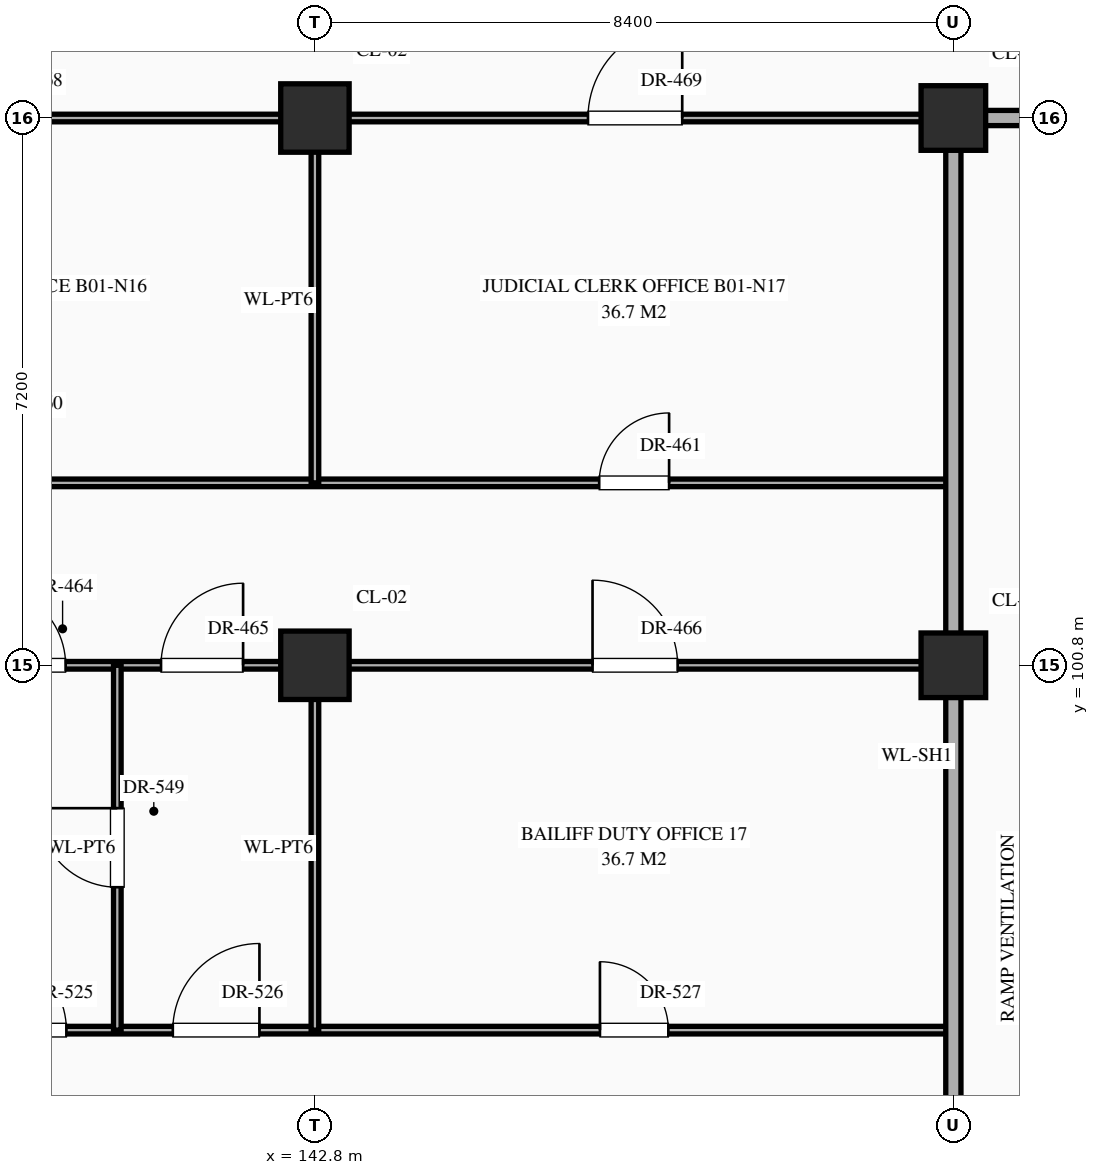
"""IFC4 building model, lengths in metres.
Left out: names, types, materials, properties, quantities, classifications, styles, units other than length and angle.
Written with IfcOpenShell. Run it as: python <this file> out.ifc"""

import sys

from ifc_helpers import new_model, si_unit, direction, frame, frame_2d, origin, origin_2d, place, context, subcontext, project, spatial, rectangle, extrude, element, fill, save


model = new_model("IFC4")
c1 = context("Model", 3, precision=1e-05, world=origin(), true_north=direction((0.0, 1.0)))
c2 = subcontext(c1, "Body", "Model", "MODEL_VIEW")
j1 = project(units=[si_unit("LENGTHUNIT", "METRE"), si_unit("PLANEANGLEUNIT", "RADIAN")], contexts=[c1])
p1 = place(None, origin())
s1 = spatial("IfcSite", under=j1, at=p1, CompositionType="ELEMENT")
p2 = place(p1, origin())
s2 = spatial("IfcBuilding", under=s1, at=p2, CompositionType="ELEMENT")
p3 = place(p2, frame((0.0, 0.0, -5.4)))
s3 = spatial("IfcBuildingStorey", under=s2, at=p3, CompositionType="ELEMENT", Elevation=-5.4)
for number, where, z_axis, x_axis in (
    (1, (142.8, 100.8, 0.0), (0.0, 0.0, 1.0), (1.0, 0.0, 0.0)),
    (2, (142.8, 108.0, 0.0), (0.0, 0.0, 1.0), (1.0, 0.0, 0.0)),
):
    element("IfcColumn", number, at=place(p3, frame(where, z_axis=z_axis, x_axis=x_axis)), inside=s3, PredefinedType="COLUMN", context=c2, shape_type="SweptSolid", body=[
        extrude(rectangle(XDim=0.9, YDim=0.9, at=origin_2d()), origin(), (0.0, 0.0, 1.0), 5.4),
    ])
for number, where, z_axis, x_axis in (
    (3, (151.2, 100.8, 0.0), (0.0, 0.0, 1.0), (1.0, 0.0, 0.0)),
    (4, (151.2, 108.0, 0.0), (0.0, 0.0, 1.0), (1.0, 0.0, 0.0)),
):
    element("IfcColumn", number, at=place(p3, frame(where, z_axis=z_axis, x_axis=x_axis)), inside=s3, PredefinedType="COLUMN", context=c2, shape_type="SweptSolid", body=[
        extrude(rectangle(XDim=0.85, YDim=0.85, at=origin_2d()), origin(), (0.0, 0.0, 1.0), 5.4),
    ])
p4 = place(p3, frame((16.8, 96.0, 0.0), z_axis=(0.0, 0.0, 1.0), x_axis=(1.0, 0.0, 0.0)))
e5 = element("IfcWall", 5, at=p4, inside=s3, PredefinedType="STANDARD", context=c2, shape_type="SweptSolid", body=[
    extrude(rectangle(XDim=134.4, YDim=0.1, at=frame_2d((67.2, 0.0))), origin(), (0.0, 0.0, 1.0), 5.1),
])
p5 = place(p4, frame((3.56, 0.0, 0.0)))
e6 = element("IfcOpeningElement", 6, at=p5, cuts=e5, PredefinedType="OPENING", context=c2, shape_type="SweptSolid", body=[
    extrude(rectangle(XDim=1.28, YDim=2.35, at=frame_2d((0.64, 1.175))), frame((0.0, 0.062, 0.0), z_axis=(0.0, -1.0, 0.0), x_axis=(1.0, 0.0, 0.0)), (0.0, 0.0, 1.0), 0.124),
])
p6 = place(p4, frame((9.63, 0.0, 0.0)))
e7 = element("IfcOpeningElement", 7, at=p6, cuts=e5, PredefinedType="OPENING", context=c2, shape_type="SweptSolid", body=[
    extrude(rectangle(XDim=0.94, YDim=2.3, at=frame_2d((0.47, 1.15))), frame((0.0, 0.062, 0.0), z_axis=(0.0, -1.0, 0.0), x_axis=(1.0, 0.0, 0.0)), (0.0, 0.0, 1.0), 0.124),
])
p7 = place(p4, frame((12.51, 0.0, 0.0)))
e8 = element("IfcOpeningElement", 8, at=p7, cuts=e5, PredefinedType="OPENING", context=c2, shape_type="SweptSolid", body=[
    extrude(rectangle(XDim=0.98, YDim=2.35, at=frame_2d((0.49, 1.175))), frame((0.0, 0.062, 0.0), z_axis=(0.0, -1.0, 0.0), x_axis=(1.0, 0.0, 0.0)), (0.0, 0.0, 1.0), 0.124),
])
p8 = place(p4, frame((14.99, 0.0, 0.0)))
e9 = element("IfcOpeningElement", 9, at=p8, cuts=e5, PredefinedType="OPENING", context=c2, shape_type="SweptSolid", body=[
    extrude(rectangle(XDim=1.02, YDim=2.4, at=frame_2d((0.51, 1.2))), frame((0.0, 0.062, 0.0), z_axis=(0.0, -1.0, 0.0), x_axis=(1.0, 0.0, 0.0)), (0.0, 0.0, 1.0), 0.124),
])
p9 = place(p4, frame((20.47, 0.0, 0.0)))
e10 = element("IfcOpeningElement", 10, at=p9, cuts=e5, PredefinedType="OPENING", context=c2, shape_type="SweptSolid", body=[
    extrude(rectangle(XDim=1.06, YDim=2.4, at=frame_2d((0.53, 1.2))), frame((0.0, 0.062, 0.0), z_axis=(0.0, -1.0, 0.0), x_axis=(1.0, 0.0, 0.0)), (0.0, 0.0, 1.0), 0.124),
])
p10 = place(p4, frame((28.83, 0.0, 0.0)))
e11 = element("IfcOpeningElement", 11, at=p10, cuts=e5, PredefinedType="OPENING", context=c2, shape_type="SweptSolid", body=[
    extrude(rectangle(XDim=1.14, YDim=2.4, at=frame_2d((0.57, 1.2))), frame((0.0, 0.062, 0.0), z_axis=(0.0, -1.0, 0.0), x_axis=(1.0, 0.0, 0.0)), (0.0, 0.0, 1.0), 0.124),
])
p11 = place(p4, frame((34.78, 0.0, 0.0)))
e12 = element("IfcOpeningElement", 12, at=p11, cuts=e5, PredefinedType="OPENING", context=c2, shape_type="SweptSolid", body=[
    extrude(rectangle(XDim=1.04, YDim=2.2, at=frame_2d((0.52, 1.1))), frame((0.0, 0.062, 0.0), z_axis=(0.0, -1.0, 0.0), x_axis=(1.0, 0.0, 0.0)), (0.0, 0.0, 1.0), 0.124),
])
p12 = place(p4, frame((37.66, 0.0, 0.0)))
e13 = element("IfcOpeningElement", 13, at=p12, cuts=e5, PredefinedType="OPENING", context=c2, shape_type="SweptSolid", body=[
    extrude(rectangle(XDim=1.08, YDim=2.25, at=frame_2d((0.54, 1.125))), frame((0.0, 0.062, 0.0), z_axis=(0.0, -1.0, 0.0), x_axis=(1.0, 0.0, 0.0)), (0.0, 0.0, 1.0), 0.124),
])
p13 = place(p4, frame((40.14, 0.0, 0.0)))
e14 = element("IfcOpeningElement", 14, at=p13, cuts=e5, PredefinedType="OPENING", context=c2, shape_type="SweptSolid", body=[
    extrude(rectangle(XDim=1.12, YDim=2.25, at=frame_2d((0.56, 1.125))), frame((0.0, 0.062, 0.0), z_axis=(0.0, -1.0, 0.0), x_axis=(1.0, 0.0, 0.0)), (0.0, 0.0, 1.0), 0.124),
])
p14 = place(p4, frame((45.62, 0.0, 0.0)))
e15 = element("IfcOpeningElement", 15, at=p14, cuts=e5, PredefinedType="OPENING", context=c2, shape_type="SweptSolid", body=[
    extrude(rectangle(XDim=1.16, YDim=2.3, at=frame_2d((0.58, 1.15))), frame((0.0, 0.062, 0.0), z_axis=(0.0, -1.0, 0.0), x_axis=(1.0, 0.0, 0.0)), (0.0, 0.0, 1.0), 0.124),
])
p15 = place(p4, frame((54.0, 0.0, 0.0)))
e16 = element("IfcOpeningElement", 16, at=p15, cuts=e5, PredefinedType="OPENING", context=c2, shape_type="SweptSolid", body=[
    extrude(rectangle(XDim=1.2, YDim=2.35, at=frame_2d((0.6, 1.175))), frame((0.0, 0.062, 0.0), z_axis=(0.0, -1.0, 0.0), x_axis=(1.0, 0.0, 0.0)), (0.0, 0.0, 1.0), 0.124),
])
p16 = place(p4, frame((62.38, 0.0, 0.0)))
e17 = element("IfcOpeningElement", 17, at=p16, cuts=e5, PredefinedType="OPENING", context=c2, shape_type="SweptSolid", body=[
    extrude(rectangle(XDim=1.24, YDim=2.3, at=frame_2d((0.62, 1.15))), frame((0.0, 0.062, 0.0), z_axis=(0.0, -1.0, 0.0), x_axis=(1.0, 0.0, 0.0)), (0.0, 0.0, 1.0), 0.124),
])
p17 = place(p4, frame((68.37, 0.0, 0.0)))
e18 = element("IfcOpeningElement", 18, at=p17, cuts=e5, PredefinedType="OPENING", context=c2, shape_type="SweptSolid", body=[
    extrude(rectangle(XDim=1.06, YDim=2.4, at=frame_2d((0.53, 1.2))), frame((0.0, 0.062, 0.0), z_axis=(0.0, -1.0, 0.0), x_axis=(1.0, 0.0, 0.0)), (0.0, 0.0, 1.0), 0.124),
])
p18 = place(p4, frame((71.23, 0.0, 0.0)))
e19 = element("IfcOpeningElement", 19, at=p18, cuts=e5, PredefinedType="OPENING", context=c2, shape_type="SweptSolid", body=[
    extrude(rectangle(XDim=1.14, YDim=2.4, at=frame_2d((0.57, 1.2))), frame((0.0, 0.062, 0.0), z_axis=(0.0, -1.0, 0.0), x_axis=(1.0, 0.0, 0.0)), (0.0, 0.0, 1.0), 0.124),
])
p19 = place(p4, frame((73.85, 0.0, 0.0)))
e20 = element("IfcOpeningElement", 20, at=p19, cuts=e5, PredefinedType="OPENING", context=c2, shape_type="SweptSolid", body=[
    extrude(rectangle(XDim=0.9, YDim=2.15, at=frame_2d((0.45, 1.075))), frame((0.0, 0.062, 0.0), z_axis=(0.0, -1.0, 0.0), x_axis=(1.0, 0.0, 0.0)), (0.0, 0.0, 1.0), 0.124),
])
p20 = place(p4, frame((79.37, 0.0, 0.0)))
e21 = element("IfcOpeningElement", 21, at=p20, cuts=e5, PredefinedType="OPENING", context=c2, shape_type="SweptSolid", body=[
    extrude(rectangle(XDim=0.86, YDim=2.1, at=frame_2d((0.43, 1.05))), frame((0.0, 0.062, 0.0), z_axis=(0.0, -1.0, 0.0), x_axis=(1.0, 0.0, 0.0)), (0.0, 0.0, 1.0), 0.124),
])
p21 = place(p4, frame((87.74, 0.0, 0.0)))
e22 = element("IfcOpeningElement", 22, at=p21, cuts=e5, PredefinedType="OPENING", context=c2, shape_type="SweptSolid", body=[
    extrude(rectangle(XDim=0.92, YDim=2.15, at=frame_2d((0.46, 1.075))), frame((0.0, 0.062, 0.0), z_axis=(0.0, -1.0, 0.0), x_axis=(1.0, 0.0, 0.0)), (0.0, 0.0, 1.0), 0.124),
])
p22 = place(p4, frame((93.62, 0.0, 0.0)))
e23 = element("IfcOpeningElement", 23, at=p22, cuts=e5, PredefinedType="OPENING", context=c2, shape_type="SweptSolid", body=[
    extrude(rectangle(XDim=0.96, YDim=2.2, at=frame_2d((0.48, 1.1))), frame((0.0, 0.062, 0.0), z_axis=(0.0, -1.0, 0.0), x_axis=(1.0, 0.0, 0.0)), (0.0, 0.0, 1.0), 0.124),
])
p23 = place(p4, frame((96.5, 0.0, 0.0)))
e24 = element("IfcOpeningElement", 24, at=p23, cuts=e5, PredefinedType="OPENING", context=c2, shape_type="SweptSolid", body=[
    extrude(rectangle(XDim=1.0, YDim=2.25, at=frame_2d((0.5, 1.125))), frame((0.0, 0.062, 0.0), z_axis=(0.0, -1.0, 0.0), x_axis=(1.0, 0.0, 0.0)), (0.0, 0.0, 1.0), 0.124),
])
p24 = place(p4, frame((98.98, 0.0, 0.0)))
e25 = element("IfcOpeningElement", 25, at=p24, cuts=e5, PredefinedType="OPENING", context=c2, shape_type="SweptSolid", body=[
    extrude(rectangle(XDim=1.04, YDim=2.2, at=frame_2d((0.52, 1.1))), frame((0.0, 0.062, 0.0), z_axis=(0.0, -1.0, 0.0), x_axis=(1.0, 0.0, 0.0)), (0.0, 0.0, 1.0), 0.124),
])
p25 = place(p4, frame((104.53, 0.0, 0.0)))
e26 = element("IfcOpeningElement", 26, at=p25, cuts=e5, PredefinedType="OPENING", context=c2, shape_type="SweptSolid", body=[
    extrude(rectangle(XDim=0.94, YDim=2.3, at=frame_2d((0.47, 1.15))), frame((0.0, 0.062, 0.0), z_axis=(0.0, -1.0, 0.0), x_axis=(1.0, 0.0, 0.0)), (0.0, 0.0, 1.0), 0.124),
])
p26 = place(p4, frame((112.91, 0.0, 0.0)))
e27 = element("IfcOpeningElement", 27, at=p26, cuts=e5, PredefinedType="OPENING", context=c2, shape_type="SweptSolid", body=[
    extrude(rectangle(XDim=0.98, YDim=2.35, at=frame_2d((0.49, 1.175))), frame((0.0, 0.062, 0.0), z_axis=(0.0, -1.0, 0.0), x_axis=(1.0, 0.0, 0.0)), (0.0, 0.0, 1.0), 0.124),
])
p27 = place(p4, frame((118.79, 0.0, 0.0)))
e28 = element("IfcOpeningElement", 28, at=p27, cuts=e5, PredefinedType="OPENING", context=c2, shape_type="SweptSolid", body=[
    extrude(rectangle(XDim=1.02, YDim=2.4, at=frame_2d((0.51, 1.2))), frame((0.0, 0.062, 0.0), z_axis=(0.0, -1.0, 0.0), x_axis=(1.0, 0.0, 0.0)), (0.0, 0.0, 1.0), 0.124),
])
p28 = place(p4, frame((121.67, 0.0, 0.0)))
e29 = element("IfcOpeningElement", 29, at=p28, cuts=e5, PredefinedType="OPENING", context=c2, shape_type="SweptSolid", body=[
    extrude(rectangle(XDim=1.06, YDim=2.4, at=frame_2d((0.53, 1.2))), frame((0.0, 0.062, 0.0), z_axis=(0.0, -1.0, 0.0), x_axis=(1.0, 0.0, 0.0)), (0.0, 0.0, 1.0), 0.124),
])
p29 = place(p4, frame((124.13, 0.0, 0.0)))
e30 = element("IfcOpeningElement", 30, at=p29, cuts=e5, PredefinedType="OPENING", context=c2, shape_type="SweptSolid", body=[
    extrude(rectangle(XDim=1.14, YDim=2.4, at=frame_2d((0.57, 1.2))), frame((0.0, 0.062, 0.0), z_axis=(0.0, -1.0, 0.0), x_axis=(1.0, 0.0, 0.0)), (0.0, 0.0, 1.0), 0.124),
])
p30 = place(p4, frame((129.75, 0.0, 0.0)))
e31 = element("IfcOpeningElement", 31, at=p30, cuts=e5, PredefinedType="OPENING", context=c2, shape_type="SweptSolid", body=[
    extrude(rectangle(XDim=0.9, YDim=2.15, at=frame_2d((0.45, 1.075))), frame((0.0, 0.062, 0.0), z_axis=(0.0, -1.0, 0.0), x_axis=(1.0, 0.0, 0.0)), (0.0, 0.0, 1.0), 0.124),
])
p31 = place(p3, frame((126.0, 100.8, 0.0), z_axis=(0.0, 0.0, 1.0), x_axis=(1.0, 0.0, 0.0)))
e32 = element("IfcWall", 32, at=p31, inside=s3, PredefinedType="STANDARD", context=c2, shape_type="SweptSolid", body=[
    extrude(rectangle(XDim=25.2, YDim=0.1, at=frame_2d((12.6, 0.0))), origin(), (0.0, 0.0, 1.0), 4.25),
])
p32 = place(p31, frame((3.72, 0.0, 0.0)))
e33 = element("IfcOpeningElement", 33, at=p32, cuts=e32, PredefinedType="OPENING", context=c2, shape_type="SweptSolid", body=[
    extrude(rectangle(XDim=0.96, YDim=2.2, at=frame_2d((0.48, 1.1))), frame((0.0, 0.062, 0.0), z_axis=(0.0, -1.0, 0.0), x_axis=(1.0, 0.0, 0.0)), (0.0, 0.0, 1.0), 0.124),
])
p33 = place(p31, frame((9.785, 0.0, 0.0)))
e34 = element("IfcOpeningElement", 34, at=p33, cuts=e32, PredefinedType="OPENING", context=c2, shape_type="SweptSolid", body=[
    extrude(rectangle(XDim=1.0, YDim=2.25, at=frame_2d((0.5, 1.125))), frame((0.0, 0.062, 0.0), z_axis=(0.0, -1.0, 0.0), x_axis=(1.0, 0.0, 0.0)), (0.0, 0.0, 1.0), 0.124),
])
p34 = place(p31, frame((12.48, 0.0, 0.0)))
e35 = element("IfcOpeningElement", 35, at=p34, cuts=e32, PredefinedType="OPENING", context=c2, shape_type="SweptSolid", body=[
    extrude(rectangle(XDim=1.04, YDim=2.2, at=frame_2d((0.52, 1.1))), frame((0.0, 0.062, 0.0), z_axis=(0.0, -1.0, 0.0), x_axis=(1.0, 0.0, 0.0)), (0.0, 0.0, 1.0), 0.124),
])
p35 = place(p31, frame((14.775, 0.0, 0.0)))
e36 = element("IfcOpeningElement", 36, at=p35, cuts=e32, PredefinedType="OPENING", context=c2, shape_type="SweptSolid", body=[
    extrude(rectangle(XDim=1.08, YDim=2.25, at=frame_2d((0.54, 1.125))), frame((0.0, 0.062, 0.0), z_axis=(0.0, -1.0, 0.0), x_axis=(1.0, 0.0, 0.0)), (0.0, 0.0, 1.0), 0.124),
])
p36 = place(p31, frame((20.452, 0.0, 0.0)))
e37 = element("IfcOpeningElement", 37, at=p36, cuts=e32, PredefinedType="OPENING", context=c2, shape_type="SweptSolid", body=[
    extrude(rectangle(XDim=1.12, YDim=2.25, at=frame_2d((0.56, 1.125))), frame((0.0, 0.062, 0.0), z_axis=(0.0, -1.0, 0.0), x_axis=(1.0, 0.0, 0.0)), (0.0, 0.0, 1.0), 0.124),
])
p37 = place(p3, frame((126.0, 103.2, 0.0), z_axis=(0.0, 0.0, 1.0), x_axis=(1.0, 0.0, 0.0)))
e38 = element("IfcWall", 38, at=p37, inside=s3, PredefinedType="STANDARD", context=c2, shape_type="SweptSolid", body=[
    extrude(rectangle(XDim=25.2, YDim=0.1, at=frame_2d((12.6, 0.0))), origin(), (0.0, 0.0, 1.0), 5.1),
])
p38 = place(p37, frame((3.75, 0.0, 0.0)))
e39 = element("IfcOpeningElement", 39, at=p38, cuts=e38, PredefinedType="OPENING", context=c2, shape_type="SweptSolid", body=[
    extrude(rectangle(XDim=0.9, YDim=2.15, at=frame_2d((0.45, 1.075))), frame((0.0, 0.062, 0.0), z_axis=(0.0, -1.0, 0.0), x_axis=(1.0, 0.0, 0.0)), (0.0, 0.0, 1.0), 0.124),
])
p39 = place(p37, frame((12.17, 0.0, 0.0)))
e40 = element("IfcOpeningElement", 40, at=p39, cuts=e38, PredefinedType="OPENING", context=c2, shape_type="SweptSolid", body=[
    extrude(rectangle(XDim=0.86, YDim=2.1, at=frame_2d((0.43, 1.05))), frame((0.0, 0.062, 0.0), z_axis=(0.0, -1.0, 0.0), x_axis=(1.0, 0.0, 0.0)), (0.0, 0.0, 1.0), 0.124),
])
p40 = place(p37, frame((20.54, 0.0, 0.0)))
e41 = element("IfcOpeningElement", 41, at=p40, cuts=e38, PredefinedType="OPENING", context=c2, shape_type="SweptSolid", body=[
    extrude(rectangle(XDim=0.92, YDim=2.15, at=frame_2d((0.46, 1.075))), frame((0.0, 0.062, 0.0), z_axis=(0.0, -1.0, 0.0), x_axis=(1.0, 0.0, 0.0)), (0.0, 0.0, 1.0), 0.124),
])
p41 = place(p3, frame((126.0, 108.0, 0.0), z_axis=(0.0, 0.0, 1.0), x_axis=(1.0, 0.0, 0.0)))
e42 = element("IfcWall", 42, at=p41, inside=s3, PredefinedType="STANDARD", context=c2, shape_type="SweptSolid", body=[
    extrude(rectangle(XDim=25.2, YDim=0.1, at=frame_2d((12.6, 0.0))), origin(), (0.0, 0.0, 1.0), 4.13),
])
p42 = place(p41, frame((3.62, 0.0, 0.0)))
e43 = element("IfcOpeningElement", 43, at=p42, cuts=e42, PredefinedType="OPENING", context=c2, shape_type="SweptSolid", body=[
    extrude(rectangle(XDim=1.16, YDim=2.3, at=frame_2d((0.58, 1.15))), frame((0.0, 0.062, 0.0), z_axis=(0.0, -1.0, 0.0), x_axis=(1.0, 0.0, 0.0)), (0.0, 0.0, 1.0), 0.124),
])
p43 = place(p41, frame((12.0, 0.0, 0.0)))
e44 = element("IfcOpeningElement", 44, at=p43, cuts=e42, PredefinedType="OPENING", context=c2, shape_type="SweptSolid", body=[
    extrude(rectangle(XDim=1.2, YDim=2.35, at=frame_2d((0.6, 1.175))), frame((0.0, 0.062, 0.0), z_axis=(0.0, -1.0, 0.0), x_axis=(1.0, 0.0, 0.0)), (0.0, 0.0, 1.0), 0.124),
])
p44 = place(p41, frame((20.393, 0.0, 0.0)))
e45 = element("IfcOpeningElement", 45, at=p44, cuts=e42, PredefinedType="OPENING", context=c2, shape_type="SweptSolid", body=[
    extrude(rectangle(XDim=1.24, YDim=2.3, at=frame_2d((0.62, 1.15))), frame((0.0, 0.062, 0.0), z_axis=(0.0, -1.0, 0.0), x_axis=(1.0, 0.0, 0.0)), (0.0, 0.0, 1.0), 0.124),
])
p45 = place(p3, frame((151.2, 108.0, 0.0), z_axis=(0.0, 0.0, 1.0), x_axis=(1.0, 0.0, 0.0)))
e46 = element("IfcWall", 46, at=p45, inside=s3, PredefinedType="STANDARD", context=c2, shape_type="SweptSolid", body=[
    extrude(rectangle(XDim=6.6, YDim=0.2, at=frame_2d((3.3, 0.0))), origin(), (0.0, 0.0, 1.0), 4.13),
])
p46 = place(p3, frame((140.2, 96.0, 0.0), z_axis=(0.0, 0.0, 1.0), x_axis=(0.0, 1.0, 0.0)))
e47 = element("IfcWall", 47, at=p46, inside=s3, PredefinedType="STANDARD", context=c2, shape_type="SweptSolid", body=[
    extrude(rectangle(XDim=4.8, YDim=0.1, at=frame_2d((2.4, 0.0))), origin(), (0.0, 0.0, 1.0), 5.1),
])
p47 = place(p46, frame((1.88, 0.0, 0.0)))
e48 = element("IfcOpeningElement", 48, at=p47, cuts=e47, PredefinedType="OPENING", context=c2, shape_type="SweptSolid", body=[
    extrude(rectangle(XDim=1.04, YDim=2.2, at=frame_2d((0.52, 1.1))), frame((0.0, 0.062, 0.0), z_axis=(0.0, -1.0, 0.0), x_axis=(1.0, 0.0, 0.0)), (0.0, 0.0, 1.0), 0.124),
])
for number, where, z_axis, x_axis in (
    (49, (142.8, 96.0, 0.0), (0.0, 0.0, 1.0), (0.0, 1.0, 0.0)),
    (50, (142.8, 103.2, 0.0), (0.0, 0.0, 1.0), (0.0, 1.0, 0.0)),
):
    element("IfcWall", number, at=place(p3, frame(where, z_axis=z_axis, x_axis=x_axis)), inside=s3, PredefinedType="STANDARD", context=c2, shape_type="SweptSolid", body=[
        extrude(rectangle(XDim=4.8, YDim=0.1, at=frame_2d((2.4, 0.0))), origin(), (0.0, 0.0, 1.0), 4.35),
    ])
p48 = place(p3, frame((151.2, 91.2, 0.0), z_axis=(0.0, 0.0, 1.0), x_axis=(0.0, 1.0, 0.0)))
e51 = element("IfcWall", 51, at=p48, inside=s3, PredefinedType="STANDARD", context=c2, shape_type="SweptSolid", body=[
    extrude(rectangle(XDim=16.8, YDim=0.2, at=frame_2d((8.4, 0.0))), origin(), (0.0, 0.0, 1.0), 4.35),
])
p49 = place(p40, origin())
e52 = element("IfcDoor", 52, at=p49, inside=s3, OperationType="SINGLE_SWING_RIGHT", PredefinedType="DOOR", context=c2, shape_type="SweptSolid", body=[
    extrude(rectangle(XDim=0.92, YDim=2.15, at=frame_2d((0.46, 1.075))), frame((0.0, 0.025, 0.0), z_axis=(0.0, -1.0, 0.0), x_axis=(1.0, 0.0, 0.0)), (0.0, 0.0, 1.0), 0.05),
])
fill(e41, e52)
p50 = place(p34, origin())
e53 = element("IfcDoor", 53, at=p50, inside=s3, OperationType="SINGLE_SWING_LEFT", PredefinedType="DOOR", context=c2, shape_type="SweptSolid", body=[
    extrude(rectangle(XDim=1.04, YDim=2.2, at=frame_2d((0.52, 1.1))), frame((0.0, 0.025, 0.0), z_axis=(0.0, -1.0, 0.0), x_axis=(1.0, 0.0, 0.0)), (0.0, 0.0, 1.0), 0.05),
])
fill(e35, e53)
p51 = place(p35, origin())
e54 = element("IfcDoor", 54, at=p51, inside=s3, OperationType="SINGLE_SWING_RIGHT", PredefinedType="DOOR", context=c2, shape_type="SweptSolid", body=[
    extrude(rectangle(XDim=1.08, YDim=2.25, at=frame_2d((0.54, 1.125))), frame((0.0, 0.025, 0.0), z_axis=(0.0, -1.0, 0.0), x_axis=(1.0, 0.0, 0.0)), (0.0, 0.0, 1.0), 0.05),
])
fill(e36, e54)
p52 = place(p36, origin())
e55 = element("IfcDoor", 55, at=p52, inside=s3, OperationType="SINGLE_SWING_LEFT", PredefinedType="DOOR", context=c2, shape_type="SweptSolid", body=[
    extrude(rectangle(XDim=1.12, YDim=2.25, at=frame_2d((0.56, 1.125))), frame((0.0, 0.025, 0.0), z_axis=(0.0, -1.0, 0.0), x_axis=(1.0, 0.0, 0.0)), (0.0, 0.0, 1.0), 0.05),
])
fill(e37, e55)
p53 = place(p44, origin())
e56 = element("IfcDoor", 56, at=p53, inside=s3, OperationType="SINGLE_SWING_RIGHT", PredefinedType="DOOR", context=c2, shape_type="SweptSolid", body=[
    extrude(rectangle(XDim=1.24, YDim=2.3, at=frame_2d((0.62, 1.15))), frame((0.0, 0.025, 0.0), z_axis=(0.0, -1.0, 0.0), x_axis=(1.0, 0.0, 0.0)), (0.0, 0.0, 1.0), 0.05),
])
fill(e45, e56)
p54 = place(p28, origin())
e57 = element("IfcDoor", 57, at=p54, inside=s3, OperationType="SINGLE_SWING_LEFT", PredefinedType="DOOR", context=c2, shape_type="SweptSolid", body=[
    extrude(rectangle(XDim=1.06, YDim=2.4, at=frame_2d((0.53, 1.2))), frame((0.0, 0.025, 0.0), z_axis=(0.0, -1.0, 0.0), x_axis=(1.0, 0.0, 0.0)), (0.0, 0.0, 1.0), 0.05),
])
fill(e29, e57)
p55 = place(p29, origin())
e58 = element("IfcDoor", 58, at=p55, inside=s3, OperationType="SINGLE_SWING_RIGHT", PredefinedType="DOOR", context=c2, shape_type="SweptSolid", body=[
    extrude(rectangle(XDim=1.14, YDim=2.4, at=frame_2d((0.57, 1.2))), frame((0.0, 0.025, 0.0), z_axis=(0.0, -1.0, 0.0), x_axis=(1.0, 0.0, 0.0)), (0.0, 0.0, 1.0), 0.05),
])
fill(e30, e58)
p56 = place(p30, origin())
e59 = element("IfcDoor", 59, at=p56, inside=s3, OperationType="SINGLE_SWING_LEFT", PredefinedType="DOOR", context=c2, shape_type="SweptSolid", body=[
    extrude(rectangle(XDim=0.9, YDim=2.15, at=frame_2d((0.45, 1.075))), frame((0.0, 0.025, 0.0), z_axis=(0.0, -1.0, 0.0), x_axis=(1.0, 0.0, 0.0)), (0.0, 0.0, 1.0), 0.05),
])
fill(e31, e59)
p57 = place(p47, origin())
e60 = element("IfcDoor", 60, at=p57, inside=s3, OperationType="SINGLE_SWING_RIGHT", PredefinedType="DOOR", context=c2, shape_type="SweptSolid", body=[
    extrude(rectangle(XDim=1.04, YDim=2.2, at=frame_2d((0.52, 1.1))), frame((0.0, 0.025, 0.0), z_axis=(0.0, -1.0, 0.0), x_axis=(1.0, 0.0, 0.0)), (0.0, 0.0, 1.0), 0.05),
])
fill(e48, e60)
save(model, sys.argv[1])
